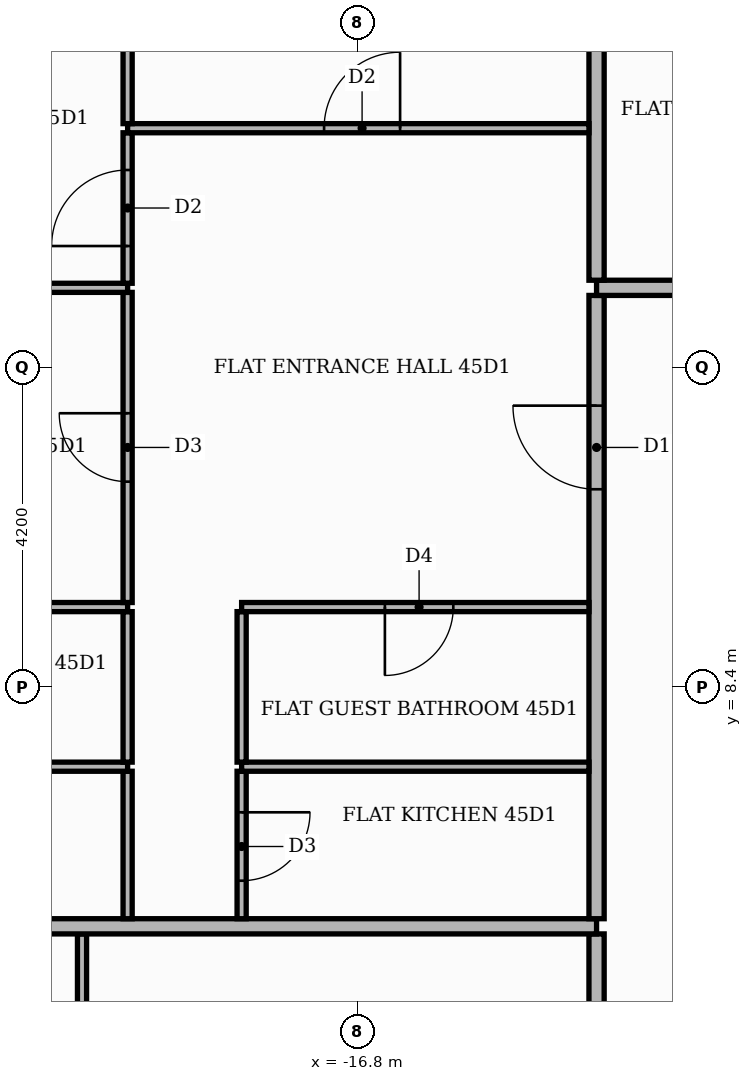
"""IFC4 building model, lengths in metres.
Left out: names, types, materials, properties, quantities, classifications, styles, units other than length and angle.
Written with IfcOpenShell. Run it as: python <this file> out.ifc"""

import sys

from ifc_helpers import new_model, si_unit, direction, frame, frame_2d, origin, place, context, subcontext, project, spatial, rectangle, extrude, element, fill, save


model = new_model("IFC4")
c1 = context("Model", 3, precision=1e-05, world=origin(), true_north=direction((0.0, 1.0)))
c2 = subcontext(c1, "Body", "Model", "MODEL_VIEW")
j1 = project(units=[si_unit("LENGTHUNIT", "METRE"), si_unit("PLANEANGLEUNIT", "RADIAN")], contexts=[c1])
p1 = place(None, origin())
s1 = spatial("IfcSite", under=j1, at=p1, CompositionType="ELEMENT")
p2 = place(p1, origin())
s2 = spatial("IfcBuilding", under=s1, at=p2, CompositionType="ELEMENT")
p3 = place(p2, frame((0.0, 0.0, 192.3)))
s3 = spatial("IfcBuildingStorey", under=s2, at=p3, CompositionType="ELEMENT", Elevation=192.3)
p4 = place(p3, frame((-13.65, -13.55, 0.0), z_axis=(0.0, 0.0, 1.0), x_axis=(0.0, 1.0, 0.0)))
e1 = element("IfcWall", 1, at=p4, inside=s3, PredefinedType="PARTITIONING", context=c2, shape_type="SweptSolid", body=[
    extrude(rectangle(XDim=18.7, YDim=0.2, at=frame_2d((9.35, 0.0))), origin(), (0.0, 0.0, 1.0), 3.48),
])
p5 = place(p4, frame((16.15, 0.0, 0.0)))
e2 = element("IfcOpeningElement", 2, at=p5, cuts=e1, PredefinedType="OPENING", context=c2, shape_type="SweptSolid", body=[
    extrude(rectangle(XDim=1.1, YDim=2.4, at=frame_2d((0.55, 1.2))), frame((0.0, 0.11, 0.0), z_axis=(0.0, -1.0, 0.0), x_axis=(1.0, 0.0, 0.0)), (0.0, 0.0, 1.0), 0.22),
])
p6 = place(p3, frame((-20.42, 1.11, 0.0), z_axis=(0.0, 0.0, 1.0), x_axis=(0.0, 1.0, 0.0)))
e3 = element("IfcWall", 3, at=p6, inside=s3, PredefinedType="PARTITIONING", context=c2, shape_type="SweptSolid", body=[
    extrude(rectangle(XDim=4.04, YDim=0.12, at=frame_2d((2.02, 0.0))), origin(), (0.0, 0.0, 1.0), 3.48),
])
p7 = place(p6, frame((1.54, 0.0, 0.0)))
e4 = element("IfcOpeningElement", 4, at=p7, cuts=e3, PredefinedType="OPENING", context=c2, shape_type="SweptSolid", body=[
    extrude(rectangle(XDim=1.0, YDim=2.1, at=frame_2d((0.5, 1.05))), frame((0.0, 0.07, 0.0), z_axis=(0.0, -1.0, 0.0), x_axis=(1.0, 0.0, 0.0)), (0.0, 0.0, 1.0), 0.14),
])
p8 = place(p3, frame((-25.42, 5.25, 0.0), z_axis=(0.0, 0.0, 1.0), x_axis=(1.0, 0.0, 0.0)))
e5 = element("IfcWall", 5, at=p8, inside=s3, PredefinedType="PARTITIONING", context=c2, shape_type="SweptSolid", body=[
    extrude(rectangle(XDim=11.77, YDim=0.2, at=frame_2d((5.885, 0.0))), origin(), (0.0, 0.0, 1.0), 3.48),
])
p9 = place(p3, frame((-19.82, 5.35, 0.0), z_axis=(0.0, 0.0, 1.0), x_axis=(0.0, 1.0, 0.0)))
e6 = element("IfcWall", 6, at=p9, inside=s3, PredefinedType="PARTITIONING", context=c2, shape_type="SweptSolid", body=[
    extrude(rectangle(XDim=1.94, YDim=0.12, at=frame_2d((0.97, 0.0))), origin(), (0.0, 0.0, 1.0), 3.48),
])
p10 = place(p3, frame((-18.32, 5.35, 0.0), z_axis=(0.0, 0.0, 1.0), x_axis=(0.0, 1.0, 0.0)))
e7 = element("IfcWall", 7, at=p10, inside=s3, PredefinedType="PARTITIONING", context=c2, shape_type="SweptSolid", body=[
    extrude(rectangle(XDim=1.94, YDim=0.12, at=frame_2d((0.97, 0.0))), origin(), (0.0, 0.0, 1.0), 3.48),
])
p11 = place(p10, frame((0.5, 0.0, 0.0)))
e8 = element("IfcOpeningElement", 8, at=p11, cuts=e7, PredefinedType="OPENING", context=c2, shape_type="SweptSolid", body=[
    extrude(rectangle(XDim=0.9, YDim=2.1, at=frame_2d((0.45, 1.05))), frame((0.0, 0.07, 0.0), z_axis=(0.0, -1.0, 0.0), x_axis=(1.0, 0.0, 0.0)), (0.0, 0.0, 1.0), 0.14),
])
p12 = place(p3, frame((-13.65, 5.35, 0.0), z_axis=(0.0, 0.0, 1.0), x_axis=(0.0, 1.0, 0.0)))
e9 = element("IfcWall", 9, at=p12, inside=s3, PredefinedType="PARTITIONING", context=c2, shape_type="SweptSolid", body=[
    extrude(rectangle(XDim=8.2, YDim=0.2, at=frame_2d((4.1, 0.0))), origin(), (0.0, 0.0, 1.0), 3.48),
])
p13 = place(p12, frame((5.65, 0.0, 0.0)))
e10 = element("IfcOpeningElement", 10, at=p13, cuts=e9, PredefinedType="OPENING", context=c2, shape_type="SweptSolid", body=[
    extrude(rectangle(XDim=1.1, YDim=2.4, at=frame_2d((0.55, 1.2))), frame((0.0, 0.11, 0.0), z_axis=(0.0, -1.0, 0.0), x_axis=(1.0, 0.0, 0.0)), (0.0, 0.0, 1.0), 0.22),
])
p14 = place(p3, frame((-25.42, 7.35, 0.0), z_axis=(0.0, 0.0, 1.0), x_axis=(1.0, 0.0, 0.0)))
e11 = element("IfcWall", 11, at=p14, inside=s3, PredefinedType="PARTITIONING", context=c2, shape_type="SweptSolid", body=[
    extrude(rectangle(XDim=5.6, YDim=0.12, at=frame_2d((2.8, 0.0))), origin(), (0.0, 0.0, 1.0), 3.48),
])
p15 = place(p14, frame((2.2, 0.0, 0.0)))
e12 = element("IfcOpeningElement", 12, at=p15, cuts=e11, PredefinedType="OPENING", context=c2, shape_type="SweptSolid", body=[
    extrude(rectangle(XDim=0.9, YDim=2.1, at=frame_2d((0.45, 1.05))), frame((0.0, 0.07, 0.0), z_axis=(0.0, -1.0, 0.0), x_axis=(1.0, 0.0, 0.0)), (0.0, 0.0, 1.0), 0.14),
])
p16 = place(p3, frame((-18.32, 7.35, 0.0), z_axis=(0.0, 0.0, 1.0), x_axis=(1.0, 0.0, 0.0)))
e13 = element("IfcWall", 13, at=p16, inside=s3, PredefinedType="PARTITIONING", context=c2, shape_type="SweptSolid", body=[
    extrude(rectangle(XDim=4.57, YDim=0.12, at=frame_2d((2.285, 0.0))), origin(), (0.0, 0.0, 1.0), 3.48),
])
for number, where, z_axis, x_axis in (
    (14, (-19.82, 7.41, 0.0), (0.0, 0.0, 1.0), (0.0, 1.0, 0.0)),
    (15, (-18.32, 7.41, 0.0), (0.0, 0.0, 1.0), (0.0, 1.0, 0.0)),
):
    element("IfcWall", number, at=place(p3, frame(where, z_axis=z_axis, x_axis=x_axis)), inside=s3, PredefinedType="PARTITIONING", context=c2, shape_type="SweptSolid", body=[
        extrude(rectangle(XDim=1.98, YDim=0.12, at=frame_2d((0.99, 0.0))), origin(), (0.0, 0.0, 1.0), 3.48),
    ])
p17 = place(p3, frame((-25.42, 9.45, 0.0), z_axis=(0.0, 0.0, 1.0), x_axis=(1.0, 0.0, 0.0)))
e16 = element("IfcWall", 16, at=p17, inside=s3, PredefinedType="PARTITIONING", context=c2, shape_type="SweptSolid", body=[
    extrude(rectangle(XDim=5.6, YDim=0.12, at=frame_2d((2.8, 0.0))), origin(), (0.0, 0.0, 1.0), 3.48),
])
p18 = place(p17, frame((2.2, 0.0, 0.0)))
e17 = element("IfcOpeningElement", 17, at=p18, cuts=e16, PredefinedType="OPENING", context=c2, shape_type="SweptSolid", body=[
    extrude(rectangle(XDim=0.9, YDim=2.1, at=frame_2d((0.45, 1.05))), frame((0.0, 0.07, 0.0), z_axis=(0.0, -1.0, 0.0), x_axis=(1.0, 0.0, 0.0)), (0.0, 0.0, 1.0), 0.14),
])
p19 = place(p3, frame((-18.32, 9.45, 0.0), z_axis=(0.0, 0.0, 1.0), x_axis=(1.0, 0.0, 0.0)))
e18 = element("IfcWall", 18, at=p19, inside=s3, PredefinedType="PARTITIONING", context=c2, shape_type="SweptSolid", body=[
    extrude(rectangle(XDim=4.57, YDim=0.12, at=frame_2d((2.285, 0.0))), origin(), (0.0, 0.0, 1.0), 3.48),
])
p20 = place(p19, frame((1.885, 0.0, 0.0)))
e19 = element("IfcOpeningElement", 19, at=p20, cuts=e18, PredefinedType="OPENING", context=c2, shape_type="SweptSolid", body=[
    extrude(rectangle(XDim=0.9, YDim=2.1, at=frame_2d((0.45, 1.05))), frame((0.0, 0.07, 0.0), z_axis=(0.0, -1.0, 0.0), x_axis=(1.0, 0.0, 0.0)), (0.0, 0.0, 1.0), 0.14),
])
p21 = place(p3, frame((-19.82, 9.51, 0.0), z_axis=(0.0, 0.0, 1.0), x_axis=(0.0, 1.0, 0.0)))
e20 = element("IfcWall", 20, at=p21, inside=s3, PredefinedType="PARTITIONING", context=c2, shape_type="SweptSolid", body=[
    extrude(rectangle(XDim=4.08, YDim=0.12, at=frame_2d((2.04, 0.0))), origin(), (0.0, 0.0, 1.0), 3.48),
])
p22 = place(p21, frame((1.59, 0.0, 0.0)))
e21 = element("IfcOpeningElement", 21, at=p22, cuts=e20, PredefinedType="OPENING", context=c2, shape_type="SweptSolid", body=[
    extrude(rectangle(XDim=0.9, YDim=2.1, at=frame_2d((0.45, 1.05))), frame((0.0, 0.07, 0.0), z_axis=(0.0, -1.0, 0.0), x_axis=(1.0, 0.0, 0.0)), (0.0, 0.0, 1.0), 0.14),
])
p23 = place(p3, frame((-25.42, 13.65, 0.0), z_axis=(0.0, 0.0, 1.0), x_axis=(1.0, 0.0, 0.0)))
e22 = element("IfcWall", 22, at=p23, inside=s3, PredefinedType="PARTITIONING", context=c2, shape_type="SweptSolid", body=[
    extrude(rectangle(XDim=5.6, YDim=0.12, at=frame_2d((2.8, 0.0))), origin(), (0.0, 0.0, 1.0), 3.48),
])
p24 = place(p3, frame((-13.65, 13.65, 0.0), z_axis=(0.0, 0.0, 1.0), x_axis=(1.0, 0.0, 0.0)))
e23 = element("IfcWall", 23, at=p24, inside=s3, PredefinedType="PARTITIONING", context=c2, shape_type="SweptSolid", body=[
    extrude(rectangle(XDim=39.07, YDim=0.2, at=frame_2d((19.535, 0.0))), origin(), (0.0, 0.0, 1.0), 3.48),
])
p25 = place(p24, frame((24.65, 0.0, 0.0)))
e24 = element("IfcOpeningElement", 24, at=p25, cuts=e23, PredefinedType="OPENING", context=c2, shape_type="SweptSolid", body=[
    extrude(rectangle(XDim=1.1, YDim=2.4, at=frame_2d((0.55, 1.2))), frame((0.0, 0.11, 0.0), z_axis=(0.0, -1.0, 0.0), x_axis=(1.0, 0.0, 0.0)), (0.0, 0.0, 1.0), 0.22),
])
p26 = place(p24, frame((14.15, 0.0, 0.0)))
e25 = element("IfcOpeningElement", 25, at=p26, cuts=e23, PredefinedType="OPENING", context=c2, shape_type="SweptSolid", body=[
    extrude(rectangle(XDim=1.1, YDim=2.4, at=frame_2d((0.55, 1.2))), frame((0.0, 0.11, 0.0), z_axis=(0.0, -1.0, 0.0), x_axis=(1.0, 0.0, 0.0)), (0.0, 0.0, 1.0), 0.22),
])
p27 = place(p3, frame((-19.82, 13.71, 0.0), z_axis=(0.0, 0.0, 1.0), x_axis=(0.0, 1.0, 0.0)))
e26 = element("IfcWall", 26, at=p27, inside=s3, PredefinedType="PARTITIONING", context=c2, shape_type="SweptSolid", body=[
    extrude(rectangle(XDim=1.98, YDim=0.12, at=frame_2d((0.99, 0.0))), origin(), (0.0, 0.0, 1.0), 3.48),
])
p28 = place(p27, frame((0.49, 0.0, 0.0)))
e27 = element("IfcOpeningElement", 27, at=p28, cuts=e26, PredefinedType="OPENING", context=c2, shape_type="SweptSolid", body=[
    extrude(rectangle(XDim=1.0, YDim=2.1, at=frame_2d((0.5, 1.05))), frame((0.0, 0.07, 0.0), z_axis=(0.0, -1.0, 0.0), x_axis=(1.0, 0.0, 0.0)), (0.0, 0.0, 1.0), 0.14),
])
p29 = place(p3, frame((-13.65, 13.75, 0.0), z_axis=(0.0, 0.0, 1.0), x_axis=(0.0, 1.0, 0.0)))
e28 = element("IfcWall", 28, at=p29, inside=s3, PredefinedType="PARTITIONING", context=c2, shape_type="SweptSolid", body=[
    extrude(rectangle(XDim=11.67, YDim=0.2, at=frame_2d((5.835, 0.0))), origin(), (0.0, 0.0, 1.0), 3.48),
])
p30 = place(p3, frame((-19.82, 15.75, 0.0), z_axis=(0.0, 0.0, 1.0), x_axis=(1.0, 0.0, 0.0)))
e29 = element("IfcWall", 29, at=p30, inside=s3, PredefinedType="PARTITIONING", context=c2, shape_type="SweptSolid", body=[
    extrude(rectangle(XDim=6.07, YDim=0.12, at=frame_2d((3.035, 0.0))), origin(), (0.0, 0.0, 1.0), 3.48),
])
p31 = place(p30, frame((2.585, 0.0, 0.0)))
e30 = element("IfcOpeningElement", 30, at=p31, cuts=e29, PredefinedType="OPENING", context=c2, shape_type="SweptSolid", body=[
    extrude(rectangle(XDim=1.0, YDim=2.1, at=frame_2d((0.5, 1.05))), frame((0.0, 0.07, 0.0), z_axis=(0.0, -1.0, 0.0), x_axis=(1.0, 0.0, 0.0)), (0.0, 0.0, 1.0), 0.14),
])
p32 = place(p3, frame((-19.82, 15.81, 0.0), z_axis=(0.0, 0.0, 1.0), x_axis=(0.0, 1.0, 0.0)))
e31 = element("IfcWall", 31, at=p32, inside=s3, PredefinedType="PARTITIONING", context=c2, shape_type="SweptSolid", body=[
    extrude(rectangle(XDim=1.79, YDim=0.12, at=frame_2d((0.895, 0.0))), origin(), (0.0, 0.0, 1.0), 3.48),
])
p33 = place(p13, origin())
e32 = element("IfcDoor", 32, at=p33, inside=s3, OperationType="SINGLE_SWING_RIGHT", PredefinedType="DOOR", context=c2, shape_type="SweptSolid", body=[
    extrude(rectangle(XDim=1.1, YDim=2.4, at=frame_2d((0.55, 1.2))), frame((0.0, 0.025, 0.0), z_axis=(0.0, -1.0, 0.0), x_axis=(1.0, 0.0, 0.0)), (0.0, 0.0, 1.0), 0.05),
])
fill(e10, e32)
p34 = place(p31, origin())
e33 = element("IfcDoor", 33, at=p34, inside=s3, OperationType="SINGLE_SWING_RIGHT", PredefinedType="DOOR", context=c2, shape_type="SweptSolid", body=[
    extrude(rectangle(XDim=1.0, YDim=2.1, at=frame_2d((0.5, 1.05))), frame((0.0, 0.025, 0.0), z_axis=(0.0, -1.0, 0.0), x_axis=(1.0, 0.0, 0.0)), (0.0, 0.0, 1.0), 0.05),
])
fill(e30, e33)
p35 = place(p20, frame((0.9, 0.0, 0.0), z_axis=(0.0, 0.0, 1.0), x_axis=(-1.0, 0.0, 0.0)))
e34 = element("IfcDoor", 34, at=p35, inside=s3, OperationType="SINGLE_SWING_LEFT", PredefinedType="DOOR", context=c2, shape_type="SweptSolid", body=[
    extrude(rectangle(XDim=0.9, YDim=2.1, at=frame_2d((0.45, 1.05))), frame((0.0, 0.025, 0.0), z_axis=(0.0, -1.0, 0.0), x_axis=(1.0, 0.0, 0.0)), (0.0, 0.0, 1.0), 0.05),
])
fill(e19, e34)
p36 = place(p11, frame((0.9, 0.0, 0.0), z_axis=(0.0, 0.0, 1.0), x_axis=(-1.0, 0.0, 0.0)))
e35 = element("IfcDoor", 35, at=p36, inside=s3, OperationType="SINGLE_SWING_RIGHT", PredefinedType="DOOR", context=c2, shape_type="SweptSolid", body=[
    extrude(rectangle(XDim=0.9, YDim=2.1, at=frame_2d((0.45, 1.05))), frame((0.0, 0.025, 0.0), z_axis=(0.0, -1.0, 0.0), x_axis=(1.0, 0.0, 0.0)), (0.0, 0.0, 1.0), 0.05),
])
fill(e8, e35)
p37 = place(p28, origin())
e36 = element("IfcDoor", 36, at=p37, inside=s3, OperationType="SINGLE_SWING_LEFT", PredefinedType="DOOR", context=c2, shape_type="SweptSolid", body=[
    extrude(rectangle(XDim=1.0, YDim=2.1, at=frame_2d((0.5, 1.05))), frame((0.0, 0.025, 0.0), z_axis=(0.0, -1.0, 0.0), x_axis=(1.0, 0.0, 0.0)), (0.0, 0.0, 1.0), 0.05),
])
fill(e27, e36)
p38 = place(p22, origin())
e37 = element("IfcDoor", 37, at=p38, inside=s3, OperationType="SINGLE_SWING_RIGHT", PredefinedType="DOOR", context=c2, shape_type="SweptSolid", body=[
    extrude(rectangle(XDim=0.9, YDim=2.1, at=frame_2d((0.45, 1.05))), frame((0.0, 0.025, 0.0), z_axis=(0.0, -1.0, 0.0), x_axis=(1.0, 0.0, 0.0)), (0.0, 0.0, 1.0), 0.05),
])
fill(e21, e37)
save(model, sys.argv[1])
